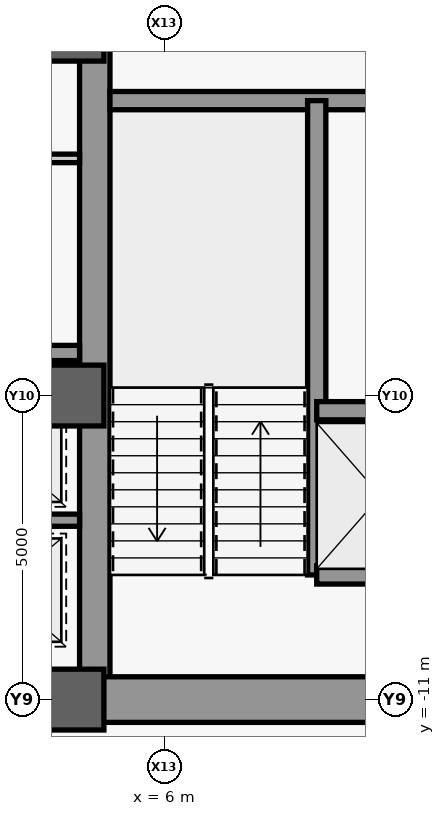
"""IFC4 building model, lengths in metres.
Left out: names, types, materials, properties, quantities, classifications, styles, units other than length and angle.
Written with IfcOpenShell. Run it as: python <this file> out.ifc"""

import sys

from ifc_helpers import new_model, si_unit, direction, frame, frame_2d, origin, origin_2d, place, context, subcontext, project, spatial, rectangle, extrude, source, transform, mapped, element, save


model = new_model("IFC4")
c1 = context("Model", 3, precision=1e-05, world=origin(), true_north=direction((0.0, 1.0)))
c2 = subcontext(c1, "Body", "Model", "MODEL_VIEW")
j1 = project(units=[si_unit("LENGTHUNIT", "METRE"), si_unit("PLANEANGLEUNIT", "RADIAN")], contexts=[c1])
p1 = place(None, origin())
s1 = spatial("IfcSite", under=j1, at=p1, CompositionType="ELEMENT")
p2 = place(p1, origin())
s2 = spatial("IfcBuilding", under=s1, at=p2, CompositionType="ELEMENT")
p3 = place(p2, frame((0.0, 0.0, 140.6)))
s3 = spatial("IfcBuildingStorey", under=s2, at=p3, CompositionType="ELEMENT", Elevation=140.6)
m1 = source(origin(), c2, "Body", "SweptSolid", [
    extrude(rectangle(XDim=21.4, YDim=0.5, at=frame_2d((10.7, 0.0))), origin(), (0.0, 0.0, 1.0), 3.84),
])
p4 = place(p3, frame((4.85, -10.7, 0.0), z_axis=(0.0, 0.0, 1.0), x_axis=(0.0, 1.0, 0.0)))
e1 = element("IfcWall", 1, at=p4, inside=s3, PredefinedType="SHEAR", context=c2, shape_type="MappedRepresentation", body=[
    mapped(m1, transform((0.0, 0.0, 0.0), scale=1.0)),
])
m2 = source(origin(), c2, "Body", "SweptSolid", [
    extrude(rectangle(XDim=5.85, YDim=0.75, at=frame_2d((2.925, 0.0))), origin(), (0.0, 0.0, 1.0), 3.84),
])
p5 = place(p3, frame((4.85, -11.0, 0.0), z_axis=(0.0, 0.0, 1.0), x_axis=(1.0, 0.0, 0.0)))
e2 = element("IfcWall", 2, at=p5, inside=s3, PredefinedType="SHEAR", context=c2, shape_type="MappedRepresentation", body=[
    mapped(m2, transform((0.0, 0.0, 0.0), scale=1.0)),
])
m3 = source(origin(), c2, "Body", "SweptSolid", [
    extrude(rectangle(XDim=5.6, YDim=0.3, at=frame_2d((2.8, 0.0))), origin(), (0.0, 0.0, 1.0), 3.84),
])
p6 = place(p3, frame((5.1, -1.15, 0.0), z_axis=(0.0, 0.0, 1.0), x_axis=(1.0, 0.0, 0.0)))
e3 = element("IfcWall", 3, at=p6, inside=s3, PredefinedType="SHEAR", context=c2, shape_type="MappedRepresentation", body=[
    mapped(m3, transform((0.0, 0.0, 0.0), scale=1.0)),
])
m4 = source(origin(), c2, "Body", "SweptSolid", [
    extrude(rectangle(XDim=9.2, YDim=0.5, at=frame_2d((4.6, 0.0))), origin(), (0.0, 0.0, 1.0), 3.84),
])
p7 = place(p3, frame((-4.6, -11.0, 0.0), z_axis=(0.0, 0.0, 1.0), x_axis=(1.0, 0.0, 0.0)))
e4 = element("IfcWall", 4, at=p7, inside=s3, PredefinedType="SHEAR", context=c2, shape_type="MappedRepresentation", body=[
    mapped(m4, transform((0.0, 0.0, 0.0), scale=1.0)),
])
m5 = source(origin(), c2, "Body", "SweptSolid", [
    extrude(rectangle(XDim=1.8, YDim=2.25, at=frame_2d((0.9, 1.125))), frame((0.0, 0.26, 0.0), z_axis=(0.0, -1.0, 0.0), x_axis=(1.0, 0.0, 0.0)), (0.0, 0.0, 1.0), 0.52),
])
p8 = place(p7, frame((3.7, 0.0, 0.0)))
e5 = element("IfcOpeningElement", 5, at=p8, cuts=e4, PredefinedType="OPENING", context=c2, shape_type="MappedRepresentation", body=[
    mapped(m5, transform((0.0, 0.0, 0.0), scale=1.0)),
])
m6 = source(origin(), c2, "Body", "SweptSolid", [
    extrude(rectangle(XDim=1.0, YDim=1.0, at=origin_2d()), origin(), (0.0, 0.0, 1.0), 4.1),
])
for number, where, z_axis, x_axis in (
    (6, (4.5, -11.0, 0.0), (0.0, 0.0, 1.0), (1.0, 0.0, 0.0)),
    (7, (4.5, -6.0, 0.0), (0.0, 0.0, 1.0), (1.0, 0.0, 0.0)),
    (8, (4.5, 0.0, 0.0), (0.0, 0.0, 1.0), (1.0, 0.0, 0.0)),
):
    element("IfcColumn", number, at=place(p3, frame(where, z_axis=z_axis, x_axis=x_axis)), inside=s3, PredefinedType="COLUMN", context=c2, shape_type="MappedRepresentation", body=[
        mapped(m6, transform((0.0, 0.0, 0.0), scale=1.0)),
    ])
m7 = source(origin(), c2, "Body", "SweptSolid", [
    extrude(rectangle(XDim=7.8, YDim=0.3, at=frame_2d((3.9, 0.0))), origin(), (0.0, 0.0, 1.0), 3.84),
])
p9 = place(p3, frame((8.5, -8.95, 0.0), z_axis=(0.0, 0.0, 1.0), x_axis=(0.0, 1.0, 0.0)))
e9 = element("IfcWall", 9, at=p9, inside=s3, PredefinedType="SHEAR", context=c2, shape_type="MappedRepresentation", body=[
    mapped(m7, transform((0.0, 0.0, 0.0), scale=1.0)),
])
m8 = source(origin(), c2, "Body", "SweptSolid", [
    extrude(rectangle(XDim=2.2, YDim=0.3, at=frame_2d((1.1, 0.0))), origin(), (0.0, 0.0, 1.0), 3.84),
])
for number, where, z_axis, x_axis in (
    (10, (8.5, -8.95, 0.0), (0.0, 0.0, 1.0), (1.0, 0.0, 0.0)),
    (11, (8.5, -6.25, 0.0), (0.0, 0.0, 1.0), (1.0, 0.0, 0.0)),
):
    element("IfcWall", number, at=place(p3, frame(where, z_axis=z_axis, x_axis=x_axis)), inside=s3, PredefinedType="SHEAR", context=c2, shape_type="MappedRepresentation", body=[
        mapped(m8, transform((0.0, 0.0, 0.0), scale=1.0)),
    ])
m9 = source(origin(), c2, "Body", "SweptSolid", [
    extrude(rectangle(XDim=2.45, YDim=0.2, at=frame_2d((1.225, 0.0))), origin(), (0.0, 0.0, 1.0), 3.84),
])
p10 = place(p3, frame((2.15, -8.05, 0.0), z_axis=(0.0, 0.0, 1.0), x_axis=(1.0, 0.0, 0.0)))
e12 = element("IfcWall", 12, at=p10, inside=s3, PredefinedType="SHEAR", context=c2, shape_type="MappedRepresentation", body=[
    mapped(m9, transform((0.0, 0.0, 0.0), scale=1.0)),
])
m10 = source(origin(), c2, "Body", "SweptSolid", [
    extrude(rectangle(XDim=9.2, YDim=0.25, at=frame_2d((4.6, 0.0))), origin(), (0.0, 0.0, 1.0), 3.84),
])
p11 = place(p3, frame((-4.6, -5.3, 0.0), z_axis=(0.0, 0.0, 1.0), x_axis=(1.0, 0.0, 0.0)))
e13 = element("IfcWall", 13, at=p11, inside=s3, PredefinedType="SHEAR", context=c2, shape_type="MappedRepresentation", body=[
    mapped(m10, transform((0.0, 0.0, 0.0), scale=1.0)),
])
m11 = source(origin(), c2, "Body", "SweptSolid", [
    extrude(rectangle(XDim=1.05, YDim=2.2, at=frame_2d((0.525, 1.1))), frame((0.0, 0.135, 0.0), z_axis=(0.0, -1.0, 0.0), x_axis=(1.0, 0.0, 0.0)), (0.0, 0.0, 1.0), 0.27),
])
p12 = place(p11, frame((4.075, 0.0, 0.0)))
e14 = element("IfcOpeningElement", 14, at=p12, cuts=e13, PredefinedType="OPENING", context=c2, shape_type="MappedRepresentation", body=[
    mapped(m11, transform((0.0, 0.0, 0.0), scale=1.0)),
])
m12 = source(origin(), c2, "Body", "SweptSolid", [
    extrude(rectangle(XDim=3.45, YDim=0.14, at=frame_2d((1.725, 0.0))), origin(), (0.0, 0.0, 1.0), 3.84),
])
p13 = place(p3, frame((1.15, -2.1, 0.0), z_axis=(0.0, 0.0, 1.0), x_axis=(1.0, 0.0, 0.0)))
e15 = element("IfcWall", 15, at=p13, inside=s3, PredefinedType="PARTITIONING", context=c2, shape_type="MappedRepresentation", body=[
    mapped(m12, transform((0.0, 0.0, 0.0), scale=1.0)),
])
save(model, sys.argv[1])
